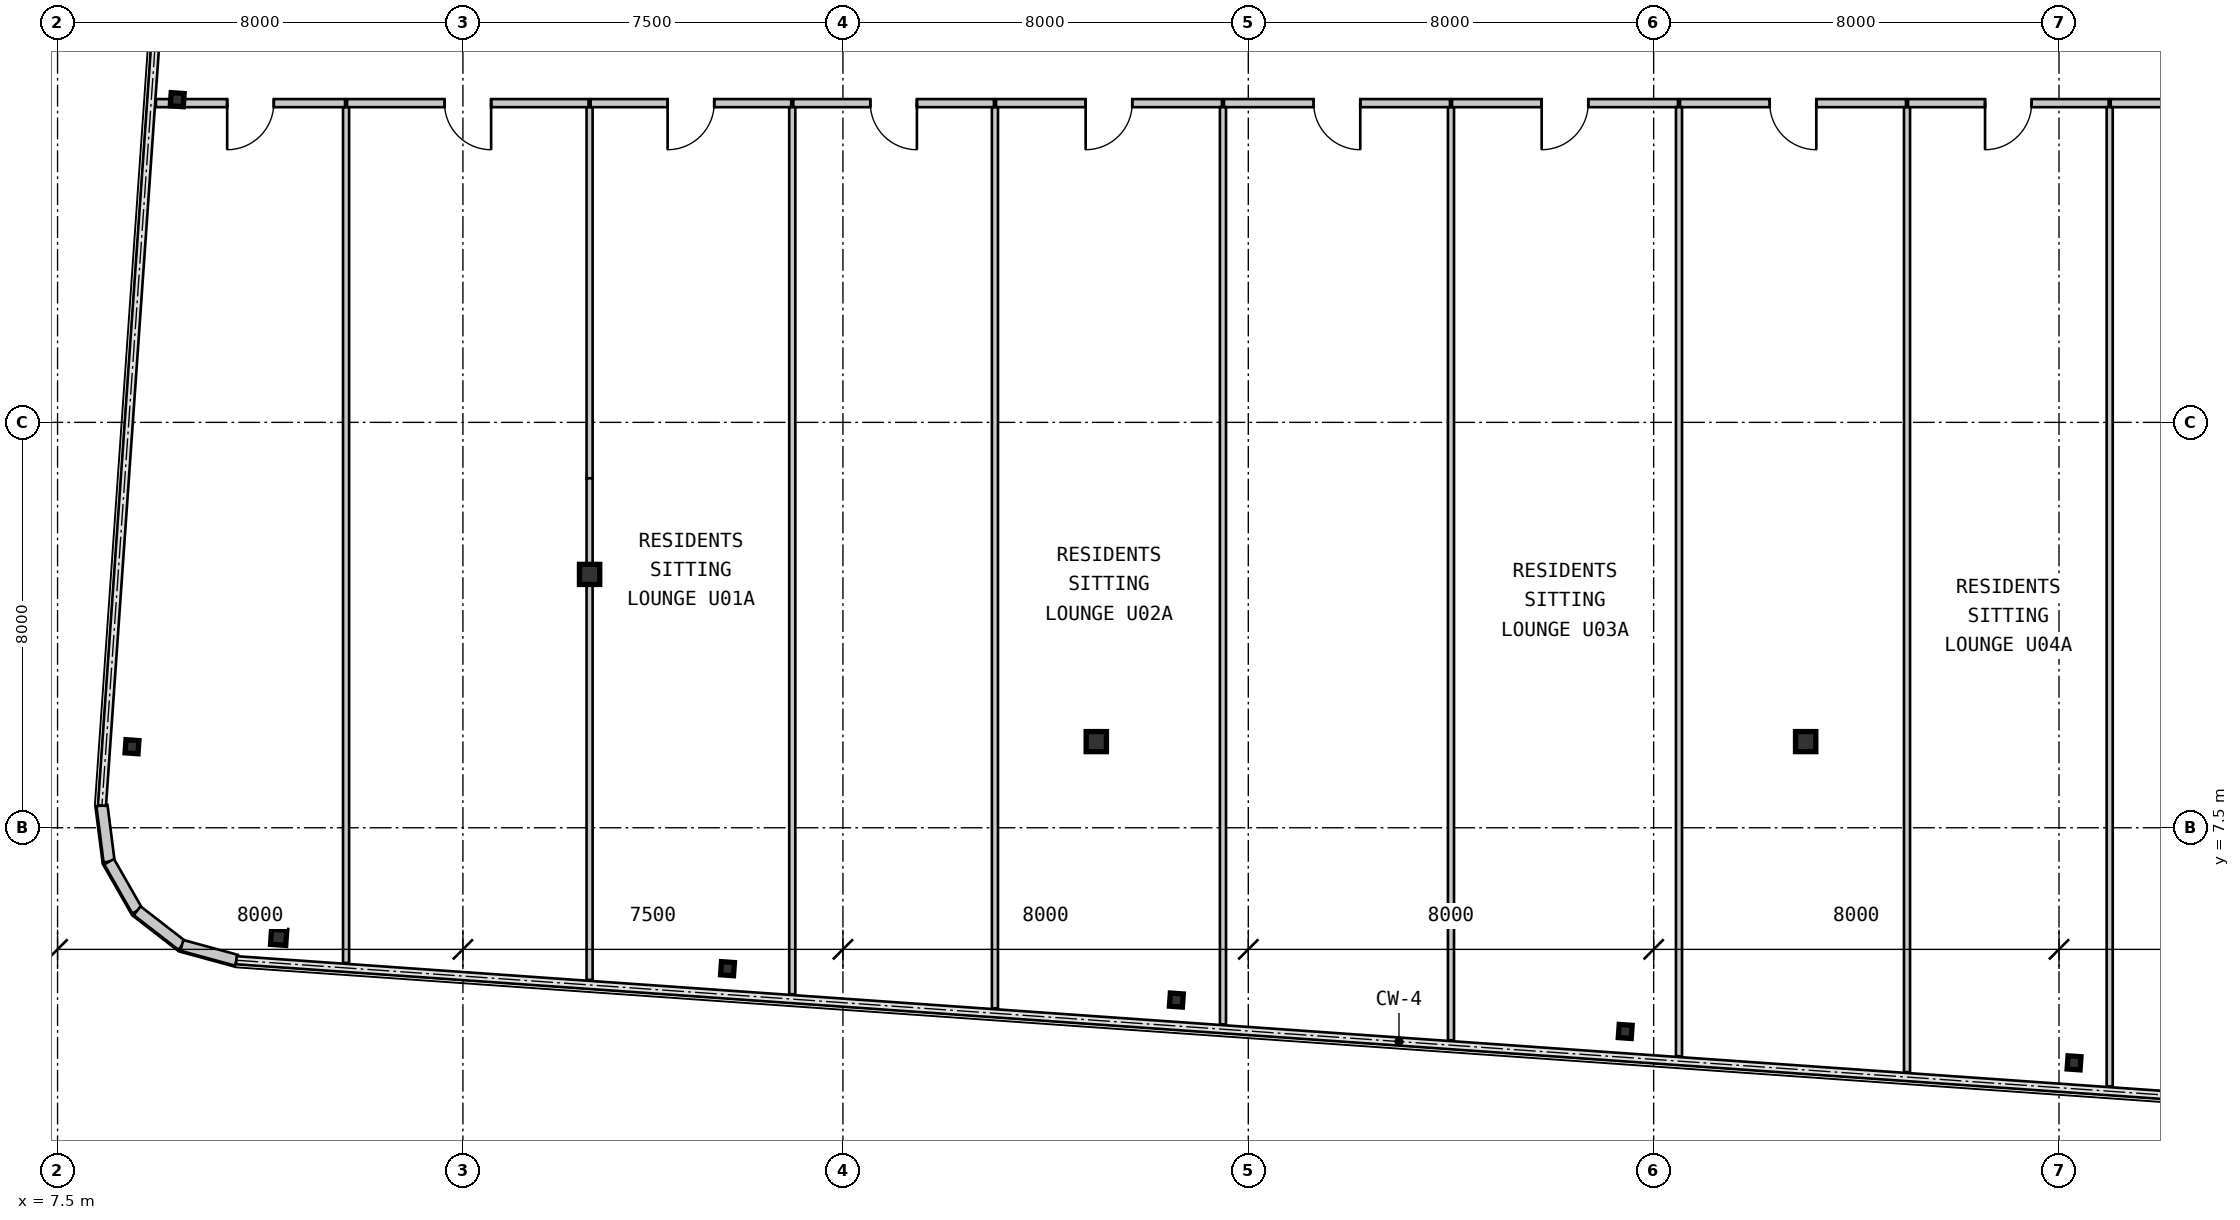
"""IFC4 building model, lengths in metres.
Left out: names, types, materials, properties, quantities, classifications, styles, units other than length and angle.
Written with IfcOpenShell. Run it as: python <this file> out.ifc"""

import sys

from ifc_helpers import new_model, si_unit, direction, frame, frame_2d, origin, origin_2d, place, context, subcontext, project, spatial, rectangle, hollow_rectangle, i_section, extrude, source, transform, mapped, element, fill, save


model = new_model("IFC4")
c1 = context("Model", 3, precision=1e-05, world=origin(), true_north=direction((0.0, 1.0)))
c2 = subcontext(c1, "Body", "Model", "MODEL_VIEW")
j1 = project(units=[si_unit("LENGTHUNIT", "METRE"), si_unit("PLANEANGLEUNIT", "RADIAN")], contexts=[c1])
p1 = place(None, origin())
s1 = spatial("IfcSite", under=j1, at=p1, CompositionType="ELEMENT")
p2 = place(p1, origin())
s2 = spatial("IfcBuilding", under=s1, at=p2, CompositionType="ELEMENT")
p3 = place(p2, frame((0.0, 0.0, 158.2)))
s3 = spatial("IfcBuildingStorey", under=s2, at=p3, CompositionType="ELEMENT", Elevation=158.2)
m1 = source(origin(), c2, "Body", "SweptSolid", [
    extrude(i_section(OverallWidth=0.4, OverallDepth=0.396, WebThickness=0.022, FlangeThickness=0.034, at=origin_2d()), origin(), (0.0, 0.0, 1.0), 3.15),
])
for number, where, z_axis, x_axis in (
    (1, (28.0, 9.2, 0.0), (0.0, 0.0, 1.0), (1.0, 0.0, 0.0)),
    (2, (42.0, 9.2, 0.0), (0.0, 0.0, 1.0), (1.0, 0.0, 0.0)),
    (3, (18.0, 12.5, 0.0), (0.0, 0.0, 1.0), (1.0, 0.0, 0.0)),
):
    element("IfcColumn", number, at=place(p3, frame(where, z_axis=z_axis, x_axis=x_axis)), inside=s3, PredefinedType="COLUMN", context=c2, shape_type="MappedRepresentation", body=[
        mapped(m1, transform((0.0, 0.0, 0.0), scale=1.0)),
    ])
m2 = source(origin(), c2, "Body", "SweptSolid", [
    extrude(hollow_rectangle(XDim=0.3, YDim=0.3, WallThickness=0.012, at=origin_2d()), origin(), (0.0, 0.0, 1.0), 3.15),
])
p4 = place(p3, frame((11.864, 5.338, 0.0), z_axis=(0.0, 0.0, 1.0), x_axis=(0.99756405026, -0.069756473744, 0.0)))
e4 = element("IfcColumn", 4, at=p4, inside=s3, PredefinedType="COLUMN", context=c2, shape_type="MappedRepresentation", body=[
    mapped(m2, transform((0.0, 0.0, 0.0), scale=1.0)),
])
m3 = source(origin(), c2, "Body", "SweptSolid", [
    extrude(i_section(OverallWidth=0.256, OverallDepth=0.26, WebThickness=0.01, FlangeThickness=0.017, at=origin_2d()), origin(), (0.0, 0.0, 1.0), 3.15),
])
for number, where, z_axis, x_axis in (
    (5, (20.722, 4.719, 0.0), (0.0, 0.0, 1.0), (0.998, -0.07, 0.0)),
    (6, (29.58, 4.1, 0.0), (0.0, 0.0, 1.0), (0.998, -0.07, 0.0)),
    (7, (38.439, 3.48, 0.0), (0.0, 0.0, 1.0), (0.998, -0.07, 0.0)),
    (8, (47.297, 2.861, 0.0), (0.0, 0.0, 1.0), (0.998, -0.07, 0.0)),
    (9, (8.969, 9.1, 0.0), (0.0, 0.0, 1.0), (0.998, -0.07, 0.0)),
    (10, (9.862, 21.868, 0.0), (0.0, 0.0, 1.0), (0.998, -0.07, 0.0)),
):
    element("IfcColumn", number, at=place(p3, frame(where, z_axis=z_axis, x_axis=x_axis)), inside=s3, PredefinedType="COLUMN", context=c2, shape_type="MappedRepresentation", body=[
        mapped(m3, transform((0.0, 0.0, 0.0), scale=1.0)),
    ])
m4 = source(origin(), c2, "Body", "SweptSolid", [
    extrude(rectangle(XDim=1.116, YDim=0.22, at=frame_2d((0.558, 0.0))), origin(), (0.0, 0.0, 1.0), 2.93),
])
for number, where, z_axis, x_axis in (
    (11, (8.376, 7.938, 0.0), (0.0, 0.0, 1.0), (0.126, -0.992, 0.0)),
    (12, (8.517, 6.831, 0.0), (0.0, 0.0, 1.0), (0.496, -0.868, 0.0)),
    (13, (9.071, 5.862, 0.0), (0.0, 0.0, 1.0), (0.791, -0.612, 0.0)),
    (14, (9.953, 5.179, 0.0), (0.0, 0.0, 1.0), (0.965, -0.263, 0.0)),
):
    element("IfcWall", number, at=place(p3, frame(where, z_axis=z_axis, x_axis=x_axis)), inside=s3, PredefinedType="SOLIDWALL", context=c2, shape_type="MappedRepresentation", body=[
        mapped(m4, transform((0.0, 0.0, 0.0), scale=1.0)),
    ])
m5 = source(origin(), c2, "Body", "SweptSolid", [
    extrude(rectangle(XDim=3.732, YDim=0.16, at=frame_2d((1.866, 0.0))), origin(), (0.0, 0.0, 1.0), 2.93),
])
p5 = place(p3, frame((13.174, 21.8, 0.0), z_axis=(0.0, 0.0, 1.0), x_axis=(-1.0, 0.0, 0.0)))
e15 = element("IfcWall", 15, at=p5, inside=s3, PredefinedType="PARTITIONING", context=c2, shape_type="MappedRepresentation", body=[
    mapped(m5, transform((0.0, 0.0, 0.0), scale=1.0)),
])
m6 = source(origin(), c2, "Body", "SweptSolid", [
    extrude(rectangle(XDim=0.92, YDim=2.1, at=frame_2d((0.46, 1.05))), frame((0.0, 0.09, 0.0), z_axis=(0.0, -1.0, 0.0), x_axis=(1.0, 0.0, 0.0)), (0.0, 0.0, 1.0), 0.18),
])
p6 = place(p5, frame((1.406, 0.0, 0.0)))
e16 = element("IfcOpeningElement", 16, at=p6, cuts=e15, PredefinedType="OPENING", context=c2, shape_type="MappedRepresentation", body=[
    mapped(m6, transform((0.0, 0.0, 0.0), scale=1.0)),
])
m7 = source(origin(), c2, "Body", "SweptSolid", [
    extrude(rectangle(XDim=4.765, YDim=0.16, at=frame_2d((2.383, 0.0))), origin(), (0.0, 0.0, 1.0), 2.93),
])
p7 = place(p3, frame((17.979, 21.8, 0.0), z_axis=(0.0, 0.0, 1.0), x_axis=(-1.0, 0.0, 0.0)))
e17 = element("IfcWall", 17, at=p7, inside=s3, PredefinedType="PARTITIONING", context=c2, shape_type="MappedRepresentation", body=[
    mapped(m7, transform((0.0, 0.0, 0.0), scale=1.0)),
])
p8 = place(p7, frame((1.923, 0.0, 0.0)))
e18 = element("IfcOpeningElement", 18, at=p8, cuts=e17, PredefinedType="OPENING", context=c2, shape_type="MappedRepresentation", body=[
    mapped(m6, transform((0.0, 0.0, 0.0), scale=1.0)),
])
m8 = source(origin(), c2, "Body", "SweptSolid", [
    extrude(rectangle(XDim=3.959, YDim=0.16, at=frame_2d((1.98, 0.0))), origin(), (0.0, 0.0, 1.0), 2.93),
])
p9 = place(p3, frame((21.98, 21.8, 0.0), z_axis=(0.0, 0.0, 1.0), x_axis=(-1.0, 0.0, 0.0)))
e19 = element("IfcWall", 19, at=p9, inside=s3, PredefinedType="PARTITIONING", context=c2, shape_type="MappedRepresentation", body=[
    mapped(m8, transform((0.0, 0.0, 0.0), scale=1.0)),
])
p10 = place(p9, frame((1.52, 0.0, 0.0)))
e20 = element("IfcOpeningElement", 20, at=p10, cuts=e19, PredefinedType="OPENING", context=c2, shape_type="MappedRepresentation", body=[
    mapped(m6, transform((0.0, 0.0, 0.0), scale=1.0)),
])
p11 = place(p3, frame((25.98, 21.8, 0.0), z_axis=(0.0, 0.0, 1.0), x_axis=(-1.0, 0.0, 0.0)))
e21 = element("IfcWall", 21, at=p11, inside=s3, PredefinedType="PARTITIONING", context=c2, shape_type="MappedRepresentation", body=[
    mapped(m8, transform((0.0, 0.0, 0.0), scale=1.0)),
])
p12 = place(p11, frame((1.52, 0.0, 0.0)))
e22 = element("IfcOpeningElement", 22, at=p12, cuts=e21, PredefinedType="OPENING", context=c2, shape_type="MappedRepresentation", body=[
    mapped(m6, transform((0.0, 0.0, 0.0), scale=1.0)),
])
m9 = source(origin(), c2, "Body", "SweptSolid", [
    extrude(rectangle(XDim=4.459, YDim=0.16, at=frame_2d((2.23, 0.0))), origin(), (0.0, 0.0, 1.0), 2.93),
])
p13 = place(p3, frame((30.48, 21.8, 0.0), z_axis=(0.0, 0.0, 1.0), x_axis=(-1.0, 0.0, 0.0)))
e23 = element("IfcWall", 23, at=p13, inside=s3, PredefinedType="PARTITIONING", context=c2, shape_type="MappedRepresentation", body=[
    mapped(m9, transform((0.0, 0.0, 0.0), scale=1.0)),
])
p14 = place(p13, frame((1.77, 0.0, 0.0)))
e24 = element("IfcOpeningElement", 24, at=p14, cuts=e23, PredefinedType="OPENING", context=c2, shape_type="MappedRepresentation", body=[
    mapped(m6, transform((0.0, 0.0, 0.0), scale=1.0)),
])
p15 = place(p3, frame((34.98, 21.8, 0.0), z_axis=(0.0, 0.0, 1.0), x_axis=(-1.0, 0.0, 0.0)))
e25 = element("IfcWall", 25, at=p15, inside=s3, PredefinedType="PARTITIONING", context=c2, shape_type="MappedRepresentation", body=[
    mapped(m9, transform((0.0, 0.0, 0.0), scale=1.0)),
])
p16 = place(p15, frame((1.77, 0.0, 0.0)))
e26 = element("IfcOpeningElement", 26, at=p16, cuts=e25, PredefinedType="OPENING", context=c2, shape_type="MappedRepresentation", body=[
    mapped(m6, transform((0.0, 0.0, 0.0), scale=1.0)),
])
p17 = place(p3, frame((39.48, 21.8, 0.0), z_axis=(0.0, 0.0, 1.0), x_axis=(-1.0, 0.0, 0.0)))
e27 = element("IfcWall", 27, at=p17, inside=s3, PredefinedType="PARTITIONING", context=c2, shape_type="MappedRepresentation", body=[
    mapped(m9, transform((0.0, 0.0, 0.0), scale=1.0)),
])
p18 = place(p17, frame((1.77, 0.0, 0.0)))
e28 = element("IfcOpeningElement", 28, at=p18, cuts=e27, PredefinedType="OPENING", context=c2, shape_type="MappedRepresentation", body=[
    mapped(m6, transform((0.0, 0.0, 0.0), scale=1.0)),
])
p19 = place(p3, frame((43.98, 21.8, 0.0), z_axis=(0.0, 0.0, 1.0), x_axis=(-1.0, 0.0, 0.0)))
e29 = element("IfcWall", 29, at=p19, inside=s3, PredefinedType="PARTITIONING", context=c2, shape_type="MappedRepresentation", body=[
    mapped(m9, transform((0.0, 0.0, 0.0), scale=1.0)),
])
p20 = place(p19, frame((1.77, 0.0, 0.0)))
e30 = element("IfcOpeningElement", 30, at=p20, cuts=e29, PredefinedType="OPENING", context=c2, shape_type="MappedRepresentation", body=[
    mapped(m6, transform((0.0, 0.0, 0.0), scale=1.0)),
])
p21 = place(p3, frame((47.98, 21.8, 0.0), z_axis=(0.0, 0.0, 1.0), x_axis=(-1.0, 0.0, 0.0)))
e31 = element("IfcWall", 31, at=p21, inside=s3, PredefinedType="PARTITIONING", context=c2, shape_type="MappedRepresentation", body=[
    mapped(m8, transform((0.0, 0.0, 0.0), scale=1.0)),
])
p22 = place(p21, frame((1.52, 0.0, 0.0)))
e32 = element("IfcOpeningElement", 32, at=p22, cuts=e31, PredefinedType="OPENING", context=c2, shape_type="MappedRepresentation", body=[
    mapped(m6, transform((0.0, 0.0, 0.0), scale=1.0)),
])
p23 = place(p3, frame((51.98, 21.8, 0.0), z_axis=(0.0, 0.0, 1.0), x_axis=(-1.0, 0.0, 0.0)))
e33 = element("IfcWall", 33, at=p23, inside=s3, PredefinedType="PARTITIONING", context=c2, shape_type="MappedRepresentation", body=[
    mapped(m8, transform((0.0, 0.0, 0.0), scale=1.0)),
])
p24 = place(p23, frame((1.52, 0.0, 0.0)))
e34 = element("IfcOpeningElement", 34, at=p24, cuts=e33, PredefinedType="OPENING", context=c2, shape_type="MappedRepresentation", body=[
    mapped(m6, transform((0.0, 0.0, 0.0), scale=1.0)),
])
m10 = source(origin(), c2, "Body", "SweptSolid", [
    extrude(rectangle(XDim=16.886, YDim=0.12, at=frame_2d((8.443, 0.0))), origin(), (0.0, 0.0, 1.0), 2.93),
])
p25 = place(p3, frame((13.194, 21.718, 0.0), z_axis=(0.0, 0.0, 1.0), x_axis=(0.0, -1.0, 0.0)))
e35 = element("IfcWall", 35, at=p25, inside=s3, PredefinedType="PARTITIONING", context=c2, shape_type="MappedRepresentation", body=[
    mapped(m10, transform((0.0, 0.0, 0.0), scale=1.0)),
])
m11 = source(origin(), c2, "Body", "SweptSolid", [
    extrude(rectangle(XDim=7.321, YDim=0.12, at=frame_2d((3.66, 0.0))), origin(), (0.0, 0.0, 1.0), 2.93),
])
p26 = place(p3, frame((18.0, 21.717, 0.0), z_axis=(0.0, 0.0, 1.0), x_axis=(0.0, -1.0, 0.0)))
e36 = element("IfcWall", 36, at=p26, inside=s3, PredefinedType="PARTITIONING", context=c2, shape_type="MappedRepresentation", body=[
    mapped(m11, transform((0.0, 0.0, 0.0), scale=1.0)),
])
m12 = source(origin(), c2, "Body", "SweptSolid", [
    extrude(rectangle(XDim=1.901, YDim=0.12, at=frame_2d((0.951, 0.0))), origin(), (0.0, 0.0, 1.0), 2.397),
])
p27 = place(p3, frame((18.0, 14.396, 0.0), z_axis=(0.0, 0.0, 1.0), x_axis=(0.0, -1.0, 0.0)))
e37 = element("IfcWall", 37, at=p27, inside=s3, PredefinedType="PARTITIONING", context=c2, shape_type="MappedRepresentation", body=[
    mapped(m12, transform((0.0, 0.0, 0.0), scale=1.0)),
])
m13 = source(origin(), c2, "Body", "SweptSolid", [
    extrude(rectangle(XDim=7.998, YDim=0.12, at=frame_2d((3.999, 0.0))), origin(), (0.0, 0.0, 1.0), 2.93),
])
p28 = place(p3, frame((18.0, 12.495, 0.0), z_axis=(0.0, 0.0, 1.0), x_axis=(0.0, -1.0, 0.0)))
e38 = element("IfcWall", 38, at=p28, inside=s3, PredefinedType="PARTITIONING", context=c2, shape_type="MappedRepresentation", body=[
    mapped(m13, transform((0.0, 0.0, 0.0), scale=1.0)),
])
m14 = source(origin(), c2, "Body", "SweptSolid", [
    extrude(rectangle(XDim=17.506, YDim=0.12, at=frame_2d((8.753, 0.0))), origin(), (0.0, 0.0, 1.0), 2.93),
])
p29 = place(p3, frame((22.0, 21.72, 0.0), z_axis=(0.0, 0.0, 1.0), x_axis=(0.0, -1.0, 0.0)))
e39 = element("IfcWall", 39, at=p29, inside=s3, PredefinedType="PARTITIONING", context=c2, shape_type="MappedRepresentation", body=[
    mapped(m14, transform((0.0, 0.0, 0.0), scale=1.0)),
])
m15 = source(origin(), c2, "Body", "SweptSolid", [
    extrude(rectangle(XDim=17.782, YDim=0.12, at=frame_2d((8.891, 0.0))), origin(), (0.0, 0.0, 1.0), 2.93),
])
p30 = place(p3, frame((26.0, 21.718, 0.0), z_axis=(0.0, 0.0, 1.0), x_axis=(0.0, -1.0, 0.0)))
e40 = element("IfcWall", 40, at=p30, inside=s3, PredefinedType="PARTITIONING", context=c2, shape_type="MappedRepresentation", body=[
    mapped(m15, transform((0.0, 0.0, 0.0), scale=1.0)),
])
m16 = source(origin(), c2, "Body", "SweptSolid", [
    extrude(rectangle(XDim=18.1, YDim=0.12, at=frame_2d((9.05, 0.0))), origin(), (0.0, 0.0, 1.0), 2.93),
])
p31 = place(p3, frame((30.5, 21.72, 0.0), z_axis=(0.0, 0.0, 1.0), x_axis=(0.0, -1.0, 0.0)))
e41 = element("IfcWall", 41, at=p31, inside=s3, PredefinedType="PARTITIONING", context=c2, shape_type="MappedRepresentation", body=[
    mapped(m16, transform((0.0, 0.0, 0.0), scale=1.0)),
])
m17 = source(origin(), c2, "Body", "SweptSolid", [
    extrude(rectangle(XDim=18.411, YDim=0.12, at=frame_2d((9.206, 0.0))), origin(), (0.0, 0.0, 1.0), 2.93),
])
p32 = place(p3, frame((35.0, 21.718, 0.0), z_axis=(0.0, 0.0, 1.0), x_axis=(0.0, -1.0, 0.0)))
e42 = element("IfcWall", 42, at=p32, inside=s3, PredefinedType="PARTITIONING", context=c2, shape_type="MappedRepresentation", body=[
    mapped(m17, transform((0.0, 0.0, 0.0), scale=1.0)),
])
m18 = source(origin(), c2, "Body", "SweptSolid", [
    extrude(rectangle(XDim=18.729, YDim=0.12, at=frame_2d((9.365, 0.0))), origin(), (0.0, 0.0, 1.0), 2.93),
])
p33 = place(p3, frame((39.5, 21.72, 0.0), z_axis=(0.0, 0.0, 1.0), x_axis=(0.0, -1.0, 0.0)))
e43 = element("IfcWall", 43, at=p33, inside=s3, PredefinedType="PARTITIONING", context=c2, shape_type="MappedRepresentation", body=[
    mapped(m18, transform((0.0, 0.0, 0.0), scale=1.0)),
])
m19 = source(origin(), c2, "Body", "SweptSolid", [
    extrude(rectangle(XDim=19.04, YDim=0.12, at=frame_2d((9.52, 0.0))), origin(), (0.0, 0.0, 1.0), 2.93),
])
p34 = place(p3, frame((44.0, 21.718, 0.0), z_axis=(0.0, 0.0, 1.0), x_axis=(0.0, -1.0, 0.0)))
e44 = element("IfcWall", 44, at=p34, inside=s3, PredefinedType="PARTITIONING", context=c2, shape_type="MappedRepresentation", body=[
    mapped(m19, transform((0.0, 0.0, 0.0), scale=1.0)),
])
m20 = source(origin(), c2, "Body", "SweptSolid", [
    extrude(rectangle(XDim=19.324, YDim=0.12, at=frame_2d((9.662, 0.0))), origin(), (0.0, 0.0, 1.0), 2.93),
])
p35 = place(p3, frame((48.0, 21.72, 0.0), z_axis=(0.0, 0.0, 1.0), x_axis=(0.0, -1.0, 0.0)))
e45 = element("IfcWall", 45, at=p35, inside=s3, PredefinedType="PARTITIONING", context=c2, shape_type="MappedRepresentation", body=[
    mapped(m20, transform((0.0, 0.0, 0.0), scale=1.0)),
])
m21 = source(origin(), c2, "Body", "SweptSolid", [
    extrude(rectangle(XDim=0.92, YDim=2.1, at=frame_2d((0.46, 1.05))), frame((0.0, 0.025, 0.0), z_axis=(0.0, -1.0, 0.0), x_axis=(1.0, 0.0, 0.0)), (0.0, 0.0, 1.0), 0.05),
])
p36 = place(p6, origin())
e46 = element("IfcDoor", 46, at=p36, inside=s3, OperationType="SINGLE_SWING_RIGHT", PredefinedType="DOOR", context=c2, shape_type="MappedRepresentation", body=[
    mapped(m21, transform((0.0, 0.0, 0.0), scale=1.0)),
])
fill(e16, e46)
p37 = place(p8, origin())
e47 = element("IfcDoor", 47, at=p37, inside=s3, OperationType="SINGLE_SWING_LEFT", PredefinedType="DOOR", context=c2, shape_type="MappedRepresentation", body=[
    mapped(m21, transform((0.0, 0.0, 0.0), scale=1.0)),
])
fill(e18, e47)
p38 = place(p10, origin())
e48 = element("IfcDoor", 48, at=p38, inside=s3, OperationType="SINGLE_SWING_RIGHT", PredefinedType="DOOR", context=c2, shape_type="MappedRepresentation", body=[
    mapped(m21, transform((0.0, 0.0, 0.0), scale=1.0)),
])
fill(e20, e48)
p39 = place(p12, origin())
e49 = element("IfcDoor", 49, at=p39, inside=s3, OperationType="SINGLE_SWING_LEFT", PredefinedType="DOOR", context=c2, shape_type="MappedRepresentation", body=[
    mapped(m21, transform((0.0, 0.0, 0.0), scale=1.0)),
])
fill(e22, e49)
p40 = place(p14, origin())
e50 = element("IfcDoor", 50, at=p40, inside=s3, OperationType="SINGLE_SWING_RIGHT", PredefinedType="DOOR", context=c2, shape_type="MappedRepresentation", body=[
    mapped(m21, transform((0.0, 0.0, 0.0), scale=1.0)),
])
fill(e24, e50)
p41 = place(p16, origin())
e51 = element("IfcDoor", 51, at=p41, inside=s3, OperationType="SINGLE_SWING_LEFT", PredefinedType="DOOR", context=c2, shape_type="MappedRepresentation", body=[
    mapped(m21, transform((0.0, 0.0, 0.0), scale=1.0)),
])
fill(e26, e51)
p42 = place(p18, origin())
e52 = element("IfcDoor", 52, at=p42, inside=s3, OperationType="SINGLE_SWING_RIGHT", PredefinedType="DOOR", context=c2, shape_type="MappedRepresentation", body=[
    mapped(m21, transform((0.0, 0.0, 0.0), scale=1.0)),
])
fill(e28, e52)
p43 = place(p20, origin())
e53 = element("IfcDoor", 53, at=p43, inside=s3, OperationType="SINGLE_SWING_LEFT", PredefinedType="DOOR", context=c2, shape_type="MappedRepresentation", body=[
    mapped(m21, transform((0.0, 0.0, 0.0), scale=1.0)),
])
fill(e30, e53)
p44 = place(p22, origin())
e54 = element("IfcDoor", 54, at=p44, inside=s3, OperationType="SINGLE_SWING_RIGHT", PredefinedType="DOOR", context=c2, shape_type="MappedRepresentation", body=[
    mapped(m21, transform((0.0, 0.0, 0.0), scale=1.0)),
])
fill(e32, e54)
save(model, sys.argv[1])
